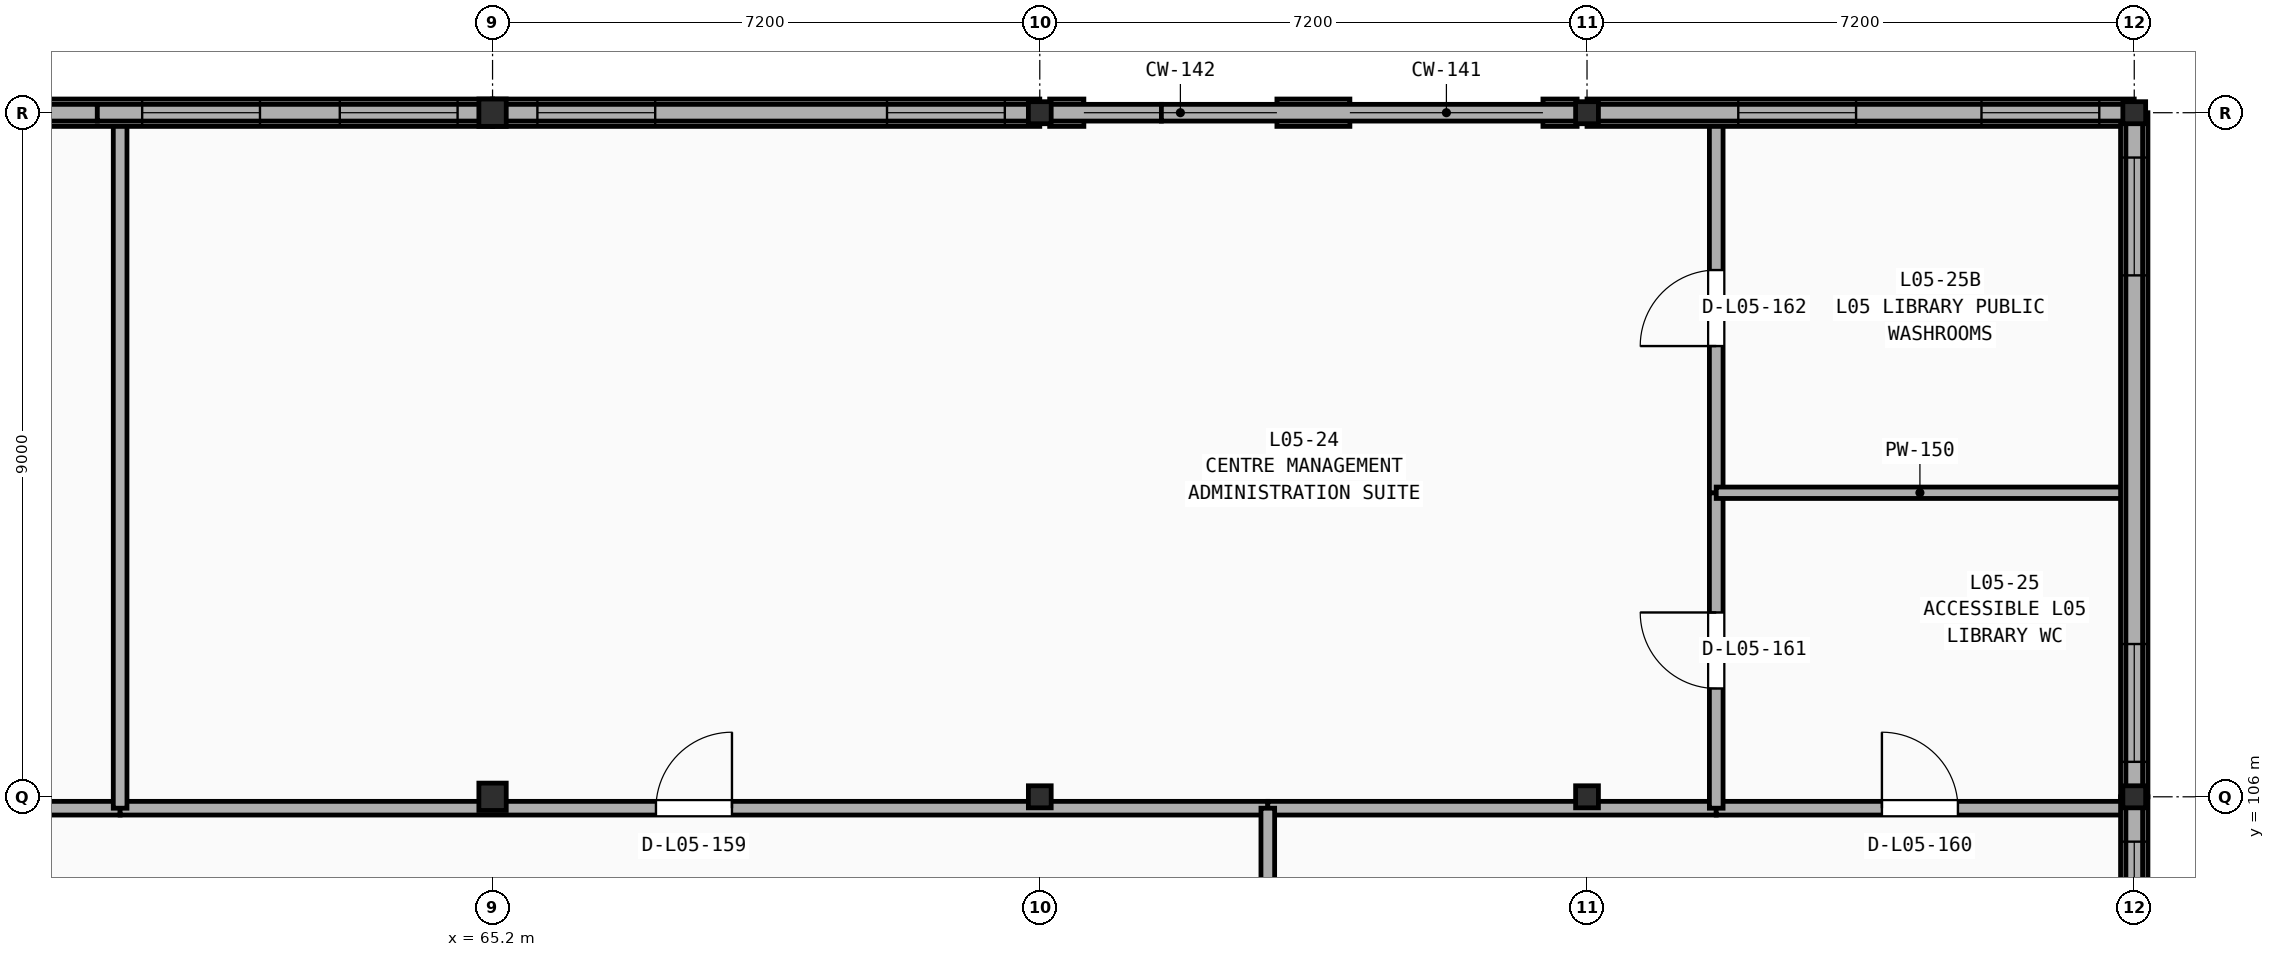
"""IFC4 building model, lengths in metres.
Left out: names, types, materials, properties, quantities, classifications, styles, units other than length and angle.
Written with IfcOpenShell. Run it as: python <this file> out.ifc"""

import sys

from ifc_helpers import new_model, si_unit, direction, frame, frame_2d, origin, origin_2d, place, context, subcontext, project, spatial, rectangle, i_section, extrude, element, fill, save


model = new_model("IFC4")
c1 = context("Model", 3, precision=1e-05, world=origin(), true_north=direction((0.0, 1.0)))
c2 = subcontext(c1, "Body", "Model", "MODEL_VIEW")
j1 = project(units=[si_unit("LENGTHUNIT", "METRE"), si_unit("PLANEANGLEUNIT", "RADIAN")], contexts=[c1])
p1 = place(None, origin())
s1 = spatial("IfcSite", under=j1, at=p1, CompositionType="ELEMENT")
p2 = place(p1, origin())
s2 = spatial("IfcBuilding", under=s1, at=p2, CompositionType="ELEMENT")
p3 = place(p2, frame((0.0, 0.0, 21.6)))
s3 = spatial("IfcBuildingStorey", under=s2, at=p3, CompositionType="ELEMENT", Elevation=21.6)
for number, where, z_axis, x_axis in (
    (1, (65.2, 106.0, 0.0), (0.0, 0.0, 1.0), (1.0, 0.0, 0.0)),
    (2, (65.2, 115.0, 0.0), (0.0, 0.0, 1.0), (1.0, 0.0, 0.0)),
):
    element("IfcColumn", number, at=place(p3, frame(where, z_axis=z_axis, x_axis=x_axis)), inside=s3, PredefinedType="COLUMN", context=c2, shape_type="SweptSolid", body=[
        extrude(rectangle(XDim=0.36, YDim=0.36, at=origin_2d()), origin(), (0.0, 0.0, 1.0), 3.6),
    ])
for number, where, z_axis, x_axis in (
    (3, (72.4, 106.0, 0.0), (0.0, 0.0, 1.0), (1.0, 0.0, 0.0)),
    (4, (72.4, 115.0, 0.0), (0.0, 0.0, 1.0), (1.0, 0.0, 0.0)),
    (5, (79.6, 106.0, 0.0), (0.0, 0.0, 1.0), (1.0, 0.0, 0.0)),
    (6, (79.6, 115.0, 0.0), (0.0, 0.0, 1.0), (1.0, 0.0, 0.0)),
    (7, (86.8, 106.0, 0.0), (0.0, 0.0, 1.0), (1.0, 0.0, 0.0)),
    (8, (86.8, 115.0, 0.0), (0.0, 0.0, 1.0), (1.0, 0.0, 0.0)),
):
    element("IfcColumn", number, at=place(p3, frame(where, z_axis=z_axis, x_axis=x_axis)), inside=s3, PredefinedType="COLUMN", context=c2, shape_type="SweptSolid", body=[
        extrude(i_section(OverallWidth=0.3, OverallDepth=0.29, WebThickness=0.009, FlangeThickness=0.014, at=origin_2d()), origin(), (0.0, 0.0, 1.0), 3.6),
    ])
p4 = place(p3, frame((54.55, 105.85, 0.0), z_axis=(0.0, 0.0, 1.0), x_axis=(1.0, 0.0, 0.0)))
e9 = element("IfcWall", 9, at=p4, inside=s3, PredefinedType="PARTITIONING", context=c2, shape_type="SweptSolid", body=[
    extrude(rectangle(XDim=5.75, YDim=0.18, at=frame_2d((2.875, 0.0))), origin(), (0.0, 0.0, 1.0), 2.71),
])
p5 = place(p3, frame((60.3, 105.85, 0.0), z_axis=(0.0, 0.0, 1.0), x_axis=(1.0, 0.0, 0.0)))
e10 = element("IfcWall", 10, at=p5, inside=s3, PredefinedType="PARTITIONING", context=c2, shape_type="SweptSolid", body=[
    extrude(rectangle(XDim=15.1, YDim=0.18, at=frame_2d((7.55, 0.0))), origin(), (0.0, 0.0, 1.0), 2.71),
])
p6 = place(p5, frame((7.05, 0.0, -0.01)))
e11 = element("IfcOpeningElement", 11, at=p6, cuts=e10, PredefinedType="OPENING", context=c2, shape_type="SweptSolid", body=[
    extrude(rectangle(XDim=1.0, YDim=2.16, at=frame_2d((0.5, 1.08))), frame((0.0, 0.1, 0.0), z_axis=(0.0, -1.0, 0.0), x_axis=(1.0, 0.0, 0.0)), (0.0, 0.0, 1.0), 0.2),
])
p7 = place(p3, frame((75.4, 105.85, 0.0), z_axis=(0.0, 0.0, 1.0), x_axis=(1.0, 0.0, 0.0)))
e12 = element("IfcWall", 12, at=p7, inside=s3, PredefinedType="PARTITIONING", context=c2, shape_type="SweptSolid", body=[
    extrude(rectangle(XDim=5.9, YDim=0.18, at=frame_2d((2.95, 0.0))), origin(), (0.0, 0.0, 1.0), 2.71),
])
p8 = place(p3, frame((81.3, 105.85, 0.0), z_axis=(0.0, 0.0, 1.0), x_axis=(1.0, 0.0, 0.0)))
e13 = element("IfcWall", 13, at=p8, inside=s3, PredefinedType="PARTITIONING", context=c2, shape_type="SweptSolid", body=[
    extrude(rectangle(XDim=5.36, YDim=0.18, at=frame_2d((2.68, 0.0))), origin(), (0.0, 0.0, 1.0), 2.71),
])
p9 = place(p8, frame((2.18, 0.0, -0.01)))
e14 = element("IfcOpeningElement", 14, at=p9, cuts=e13, PredefinedType="OPENING", context=c2, shape_type="SweptSolid", body=[
    extrude(rectangle(XDim=1.0, YDim=2.16, at=frame_2d((0.5, 1.08))), frame((0.0, 0.1, 0.0), z_axis=(0.0, -1.0, 0.0), x_axis=(1.0, 0.0, 0.0)), (0.0, 0.0, 1.0), 0.2),
])
p10 = place(p3, frame((60.3, 105.85, 0.0), z_axis=(0.0, 0.0, 1.0), x_axis=(0.0, 1.0, 0.0)))
e15 = element("IfcWall", 15, at=p10, inside=s3, PredefinedType="PARTITIONING", context=c2, shape_type="SweptSolid", body=[
    extrude(rectangle(XDim=9.01, YDim=0.18, at=frame_2d((4.505, 0.0))), origin(), (0.0, 0.0, 1.0), 2.71),
])
p11 = place(p3, frame((81.3, 105.85, 0.0), z_axis=(0.0, 0.0, 1.0), x_axis=(0.0, 1.0, 0.0)))
e16 = element("IfcWall", 16, at=p11, inside=s3, PredefinedType="PARTITIONING", context=c2, shape_type="SweptSolid", body=[
    extrude(rectangle(XDim=4.15, YDim=0.18, at=frame_2d((2.075, 0.0))), origin(), (0.0, 0.0, 1.0), 2.71),
])
p12 = place(p11, frame((1.575, 0.0, -0.01)))
e17 = element("IfcOpeningElement", 17, at=p12, cuts=e16, PredefinedType="OPENING", context=c2, shape_type="SweptSolid", body=[
    extrude(rectangle(XDim=1.0, YDim=2.16, at=frame_2d((0.5, 1.08))), frame((0.0, 0.1, 0.0), z_axis=(0.0, -1.0, 0.0), x_axis=(1.0, 0.0, 0.0)), (0.0, 0.0, 1.0), 0.2),
])
p13 = place(p3, frame((81.3, 110.0, 0.0), z_axis=(0.0, 0.0, 1.0), x_axis=(0.0, 1.0, 0.0)))
e18 = element("IfcWall", 18, at=p13, inside=s3, PredefinedType="PARTITIONING", context=c2, shape_type="SweptSolid", body=[
    extrude(rectangle(XDim=4.86, YDim=0.18, at=frame_2d((2.43, 0.0))), origin(), (0.0, 0.0, 1.0), 2.71),
])
p14 = place(p13, frame((1.93, 0.0, -0.01)))
e19 = element("IfcOpeningElement", 19, at=p14, cuts=e18, PredefinedType="OPENING", context=c2, shape_type="SweptSolid", body=[
    extrude(rectangle(XDim=1.0, YDim=2.16, at=frame_2d((0.5, 1.08))), frame((0.0, 0.1, 0.0), z_axis=(0.0, -1.0, 0.0), x_axis=(1.0, 0.0, 0.0)), (0.0, 0.0, 1.0), 0.2),
])
p15 = place(p3, frame((81.3, 110.0, 0.0), z_axis=(0.0, 0.0, 1.0), x_axis=(1.0, 0.0, 0.0)))
e20 = element("IfcWall", 20, at=p15, inside=s3, PredefinedType="PARTITIONING", context=c2, shape_type="SweptSolid", body=[
    extrude(rectangle(XDim=5.36, YDim=0.15, at=frame_2d((2.68, 0.0))), origin(), (0.0, 0.0, 1.0), 2.79),
])
p16 = place(p3, frame((75.4, 97.5, 0.0), z_axis=(0.0, 0.0, 1.0), x_axis=(0.0, 1.0, 0.0)))
e21 = element("IfcWall", 21, at=p16, inside=s3, PredefinedType="PARTITIONING", context=c2, shape_type="SweptSolid", body=[
    extrude(rectangle(XDim=8.35, YDim=0.18, at=frame_2d((4.175, 0.0))), origin(), (0.0, 0.0, 1.0), 2.71),
])
p17 = place(p3, frame((65.2, 115.0, 0.0), z_axis=(0.0, 0.0, 1.0), x_axis=(-1.0, 0.0, 0.0)))
e22 = element("IfcWall", 22, at=p17, inside=s3, PredefinedType="SOLIDWALL", context=c2, shape_type="SweptSolid", body=[
    extrude(rectangle(XDim=7.2, YDim=0.36, at=frame_2d((3.6, 0.0))), origin(), (0.0, 0.0, 1.0), 2.71),
])
p18 = place(p17, frame((0.46, 0.0, 0.75)))
e23 = element("IfcOpeningElement", 23, at=p18, cuts=e22, PredefinedType="OPENING", context=c2, shape_type="SweptSolid", body=[
    extrude(rectangle(XDim=1.55, YDim=1.82, at=frame_2d((0.775, 0.91))), frame((0.0, 0.19, 0.0), z_axis=(0.0, -1.0, 0.0), x_axis=(1.0, 0.0, 0.0)), (0.0, 0.0, 1.0), 0.38),
])
p19 = place(p17, frame((3.06, 0.0, 0.75)))
e24 = element("IfcOpeningElement", 24, at=p19, cuts=e22, PredefinedType="OPENING", context=c2, shape_type="SweptSolid", body=[
    extrude(rectangle(XDim=1.55, YDim=1.82, at=frame_2d((0.775, 0.91))), frame((0.0, 0.19, 0.0), z_axis=(0.0, -1.0, 0.0), x_axis=(1.0, 0.0, 0.0)), (0.0, 0.0, 1.0), 0.38),
])
p20 = place(p3, frame((72.4, 115.0, 0.0), z_axis=(0.0, 0.0, 1.0), x_axis=(-1.0, 0.0, 0.0)))
e25 = element("IfcWall", 25, at=p20, inside=s3, PredefinedType="SOLIDWALL", context=c2, shape_type="SweptSolid", body=[
    extrude(rectangle(XDim=7.2, YDim=0.36, at=frame_2d((3.6, 0.0))), origin(), (0.0, 0.0, 1.0), 2.71),
])
p21 = place(p20, frame((0.46, 0.0, 0.75)))
e26 = element("IfcOpeningElement", 26, at=p21, cuts=e25, PredefinedType="OPENING", context=c2, shape_type="SweptSolid", body=[
    extrude(rectangle(XDim=1.55, YDim=1.82, at=frame_2d((0.775, 0.91))), frame((0.0, 0.19, 0.0), z_axis=(0.0, -1.0, 0.0), x_axis=(1.0, 0.0, 0.0)), (0.0, 0.0, 1.0), 0.38),
])
p22 = place(p20, frame((5.06, 0.0, 0.75)))
e27 = element("IfcOpeningElement", 27, at=p22, cuts=e25, PredefinedType="OPENING", context=c2, shape_type="SweptSolid", body=[
    extrude(rectangle(XDim=1.55, YDim=1.82, at=frame_2d((0.775, 0.91))), frame((0.0, 0.19, 0.0), z_axis=(0.0, -1.0, 0.0), x_axis=(1.0, 0.0, 0.0)), (0.0, 0.0, 1.0), 0.38),
])
p23 = place(p3, frame((76.48, 115.0, 0.0), z_axis=(0.0, 0.0, 1.0), x_axis=(-1.0, 0.0, 0.0)))
e28 = element("IfcWall", 28, at=p23, inside=s3, PredefinedType="SOLIDWALL", context=c2, shape_type="SweptSolid", body=[
    extrude(rectangle(XDim=0.96, YDim=0.36, at=frame_2d((0.48, 0.0))), origin(), (0.0, 0.0, 1.0), 2.71),
])
for number, where, z_axis, x_axis in (
    (29, (79.47, 115.0, 0.0), (0.0, 0.0, 1.0), (-1.0, 0.0, 0.0)),
    (30, (72.98, 115.0, 0.0), (0.0, 0.0, 1.0), (-1.0, 0.0, 0.0)),
):
    element("IfcWall", number, at=place(p3, frame(where, z_axis=z_axis, x_axis=x_axis)), inside=s3, PredefinedType="SOLIDWALL", context=c2, shape_type="SweptSolid", body=[
        extrude(rectangle(XDim=0.45, YDim=0.36, at=frame_2d((0.225, 0.0))), origin(), (0.0, 0.0, 1.0), 2.71),
    ])
p24 = place(p3, frame((86.8, 115.0, 0.0), z_axis=(0.0, 0.0, 1.0), x_axis=(-1.0, 0.0, 0.0)))
e31 = element("IfcWall", 31, at=p24, inside=s3, PredefinedType="SOLIDWALL", context=c2, shape_type="SweptSolid", body=[
    extrude(rectangle(XDim=7.2, YDim=0.36, at=frame_2d((3.6, 0.0))), origin(), (0.0, 0.0, 1.0), 2.71),
])
p25 = place(p24, frame((0.46, 0.0, 0.75)))
e32 = element("IfcOpeningElement", 32, at=p25, cuts=e31, PredefinedType="OPENING", context=c2, shape_type="SweptSolid", body=[
    extrude(rectangle(XDim=1.55, YDim=1.82, at=frame_2d((0.775, 0.91))), frame((0.0, 0.19, 0.0), z_axis=(0.0, -1.0, 0.0), x_axis=(1.0, 0.0, 0.0)), (0.0, 0.0, 1.0), 0.38),
])
p26 = place(p24, frame((3.66, 0.0, 0.75)))
e33 = element("IfcOpeningElement", 33, at=p26, cuts=e31, PredefinedType="OPENING", context=c2, shape_type="SweptSolid", body=[
    extrude(rectangle(XDim=1.55, YDim=1.82, at=frame_2d((0.775, 0.91))), frame((0.0, 0.19, 0.0), z_axis=(0.0, -1.0, 0.0), x_axis=(1.0, 0.0, 0.0)), (0.0, 0.0, 1.0), 0.38),
])
p27 = place(p3, frame((86.8, 97.6, 0.0), z_axis=(0.0, 0.0, 1.0), x_axis=(0.0, 1.0, 0.0)))
e34 = element("IfcWall", 34, at=p27, inside=s3, PredefinedType="SOLIDWALL", context=c2, shape_type="SweptSolid", body=[
    extrude(rectangle(XDim=8.4, YDim=0.36, at=frame_2d((4.2, 0.0))), origin(), (0.0, 0.0, 1.0), 2.71),
])
p28 = place(p27, frame((0.46, 0.0, 0.75)))
e35 = element("IfcOpeningElement", 35, at=p28, cuts=e34, PredefinedType="OPENING", context=c2, shape_type="SweptSolid", body=[
    extrude(rectangle(XDim=1.55, YDim=1.82, at=frame_2d((0.775, 0.91))), frame((0.0, 0.19, 0.0), z_axis=(0.0, -1.0, 0.0), x_axis=(1.0, 0.0, 0.0)), (0.0, 0.0, 1.0), 0.38),
])
p29 = place(p27, frame((6.26, 0.0, 0.75)))
e36 = element("IfcOpeningElement", 36, at=p29, cuts=e34, PredefinedType="OPENING", context=c2, shape_type="SweptSolid", body=[
    extrude(rectangle(XDim=1.55, YDim=1.82, at=frame_2d((0.775, 0.91))), frame((0.0, 0.19, 0.0), z_axis=(0.0, -1.0, 0.0), x_axis=(1.0, 0.0, 0.0)), (0.0, 0.0, 1.0), 0.38),
])
p30 = place(p3, frame((86.8, 106.0, 0.0), z_axis=(0.0, 0.0, 1.0), x_axis=(0.0, 1.0, 0.0)))
e37 = element("IfcWall", 37, at=p30, inside=s3, PredefinedType="SOLIDWALL", context=c2, shape_type="SweptSolid", body=[
    extrude(rectangle(XDim=9.0, YDim=0.36, at=frame_2d((4.5, 0.0))), origin(), (0.0, 0.0, 1.0), 2.71),
])
p31 = place(p30, frame((0.46, 0.0, 0.75)))
e38 = element("IfcOpeningElement", 38, at=p31, cuts=e37, PredefinedType="OPENING", context=c2, shape_type="SweptSolid", body=[
    extrude(rectangle(XDim=1.55, YDim=1.82, at=frame_2d((0.775, 0.91))), frame((0.0, 0.19, 0.0), z_axis=(0.0, -1.0, 0.0), x_axis=(1.0, 0.0, 0.0)), (0.0, 0.0, 1.0), 0.38),
])
p32 = place(p30, frame((6.86, 0.0, 0.75)))
e39 = element("IfcOpeningElement", 39, at=p32, cuts=e37, PredefinedType="OPENING", context=c2, shape_type="SweptSolid", body=[
    extrude(rectangle(XDim=1.55, YDim=1.82, at=frame_2d((0.775, 0.91))), frame((0.0, 0.19, 0.0), z_axis=(0.0, -1.0, 0.0), x_axis=(1.0, 0.0, 0.0)), (0.0, 0.0, 1.0), 0.38),
])
p33 = place(p3, frame((46.0, 115.0, 3.6), z_axis=(0.0, 0.0, 1.0), x_axis=(1.0, 0.0, 0.0)))
e40 = element("IfcWall", 40, at=p33, inside=s3, PredefinedType="PARAPET", context=c2, shape_type="SweptSolid", body=[
    extrude(rectangle(XDim=14.0, YDim=0.22, at=frame_2d((7.0, 0.0))), origin(), (0.0, 0.0, 1.0), 1.2),
])
p34 = place(p3, frame((60.0, 115.0, 3.6), z_axis=(0.0, 0.0, 1.0), x_axis=(1.0, 0.0, 0.0)))
e41 = element("IfcWall", 41, at=p34, inside=s3, PredefinedType="PARAPET", context=c2, shape_type="SweptSolid", body=[
    extrude(rectangle(XDim=14.0, YDim=0.22, at=frame_2d((7.0, 0.0))), origin(), (0.0, 0.0, 1.0), 1.65),
])
p35 = place(p3, frame((74.0, 115.0, 3.6), z_axis=(0.0, 0.0, 1.0), x_axis=(1.0, 0.0, 0.0)))
e42 = element("IfcWall", 42, at=p35, inside=s3, PredefinedType="PARAPET", context=c2, shape_type="SweptSolid", body=[
    extrude(rectangle(XDim=12.8, YDim=0.22, at=frame_2d((6.4, 0.0))), origin(), (0.0, 0.0, 1.0), 1.2),
])
p36 = place(p3, frame((86.8, 89.2, 3.6), z_axis=(0.0, 0.0, 1.0), x_axis=(0.0, 1.0, 0.0)))
e43 = element("IfcWall", 43, at=p36, inside=s3, PredefinedType="PARAPET", context=c2, shape_type="SweptSolid", body=[
    extrude(rectangle(XDim=25.8, YDim=0.22, at=frame_2d((12.9, 0.0))), origin(), (0.0, 0.0, 1.0), 1.2),
])
p37 = place(p6, frame((1.0, 0.0, 0.01), z_axis=(0.0, 0.0, 1.0), x_axis=(-1.0, 0.0, 0.0)))
e44 = element("IfcDoor", 44, at=p37, inside=s3, OperationType="SINGLE_SWING_RIGHT", PredefinedType="DOOR", context=c2, shape_type="SweptSolid", body=[
    extrude(rectangle(XDim=1.0, YDim=2.15, at=frame_2d((0.5, 1.075))), frame((0.0, 0.025, 0.0), z_axis=(0.0, -1.0, 0.0), x_axis=(1.0, 0.0, 0.0)), (0.0, 0.0, 1.0), 0.05),
])
fill(e11, e44)
p38 = place(p9, frame((0.0, 0.0, 0.01)))
e45 = element("IfcDoor", 45, at=p38, inside=s3, OperationType="SINGLE_SWING_LEFT", PredefinedType="DOOR", context=c2, shape_type="SweptSolid", body=[
    extrude(rectangle(XDim=1.0, YDim=2.15, at=frame_2d((0.5, 1.075))), frame((0.0, 0.025, 0.0), z_axis=(0.0, -1.0, 0.0), x_axis=(1.0, 0.0, 0.0)), (0.0, 0.0, 1.0), 0.05),
])
fill(e14, e45)
p39 = place(p12, frame((0.0, 0.0, 0.01)))
e46 = element("IfcDoor", 46, at=p39, inside=s3, OperationType="SINGLE_SWING_RIGHT", PredefinedType="DOOR", context=c2, shape_type="SweptSolid", body=[
    extrude(rectangle(XDim=1.0, YDim=2.15, at=frame_2d((0.5, 1.075))), frame((0.0, 0.025, 0.0), z_axis=(0.0, -1.0, 0.0), x_axis=(1.0, 0.0, 0.0)), (0.0, 0.0, 1.0), 0.05),
])
fill(e17, e46)
p40 = place(p14, frame((1.0, 0.0, 0.01), z_axis=(0.0, 0.0, 1.0), x_axis=(-1.0, 0.0, 0.0)))
e47 = element("IfcDoor", 47, at=p40, inside=s3, OperationType="SINGLE_SWING_LEFT", PredefinedType="DOOR", context=c2, shape_type="SweptSolid", body=[
    extrude(rectangle(XDim=1.0, YDim=2.15, at=frame_2d((0.5, 1.075))), frame((0.0, 0.025, 0.0), z_axis=(0.0, -1.0, 0.0), x_axis=(1.0, 0.0, 0.0)), (0.0, 0.0, 1.0), 0.05),
])
fill(e19, e47)
p41 = place(p18, origin())
e48 = element("IfcWindow", 48, at=p41, inside=s3, PartitioningType="DOUBLE_PANEL_HORIZONTAL", PredefinedType="WINDOW", context=c2, shape_type="SweptSolid", body=[
    extrude(rectangle(XDim=1.55, YDim=1.82, at=frame_2d((0.775, 0.91))), frame((0.0, 0.03, 0.0), z_axis=(0.0, -1.0, 0.0), x_axis=(1.0, 0.0, 0.0)), (0.0, 0.0, 1.0), 0.06),
])
fill(e23, e48)
p42 = place(p19, origin())
e49 = element("IfcWindow", 49, at=p42, inside=s3, PartitioningType="DOUBLE_PANEL_HORIZONTAL", PredefinedType="WINDOW", context=c2, shape_type="SweptSolid", body=[
    extrude(rectangle(XDim=1.55, YDim=1.82, at=frame_2d((0.775, 0.91))), frame((0.0, 0.03, 0.0), z_axis=(0.0, -1.0, 0.0), x_axis=(1.0, 0.0, 0.0)), (0.0, 0.0, 1.0), 0.06),
])
fill(e24, e49)
p43 = place(p21, origin())
e50 = element("IfcWindow", 50, at=p43, inside=s3, PartitioningType="DOUBLE_PANEL_HORIZONTAL", PredefinedType="WINDOW", context=c2, shape_type="SweptSolid", body=[
    extrude(rectangle(XDim=1.55, YDim=1.82, at=frame_2d((0.775, 0.91))), frame((0.0, 0.03, 0.0), z_axis=(0.0, -1.0, 0.0), x_axis=(1.0, 0.0, 0.0)), (0.0, 0.0, 1.0), 0.06),
])
fill(e26, e50)
p44 = place(p22, origin())
e51 = element("IfcWindow", 51, at=p44, inside=s3, PartitioningType="DOUBLE_PANEL_HORIZONTAL", PredefinedType="WINDOW", context=c2, shape_type="SweptSolid", body=[
    extrude(rectangle(XDim=1.55, YDim=1.82, at=frame_2d((0.775, 0.91))), frame((0.0, 0.03, 0.0), z_axis=(0.0, -1.0, 0.0), x_axis=(1.0, 0.0, 0.0)), (0.0, 0.0, 1.0), 0.06),
])
fill(e27, e51)
p45 = place(p25, origin())
e52 = element("IfcWindow", 52, at=p45, inside=s3, PartitioningType="DOUBLE_PANEL_HORIZONTAL", PredefinedType="WINDOW", context=c2, shape_type="SweptSolid", body=[
    extrude(rectangle(XDim=1.55, YDim=1.82, at=frame_2d((0.775, 0.91))), frame((0.0, 0.03, 0.0), z_axis=(0.0, -1.0, 0.0), x_axis=(1.0, 0.0, 0.0)), (0.0, 0.0, 1.0), 0.06),
])
fill(e32, e52)
p46 = place(p26, origin())
e53 = element("IfcWindow", 53, at=p46, inside=s3, PartitioningType="DOUBLE_PANEL_HORIZONTAL", PredefinedType="WINDOW", context=c2, shape_type="SweptSolid", body=[
    extrude(rectangle(XDim=1.55, YDim=1.82, at=frame_2d((0.775, 0.91))), frame((0.0, 0.03, 0.0), z_axis=(0.0, -1.0, 0.0), x_axis=(1.0, 0.0, 0.0)), (0.0, 0.0, 1.0), 0.06),
])
fill(e33, e53)
p47 = place(p29, origin())
e54 = element("IfcWindow", 54, at=p47, inside=s3, PartitioningType="DOUBLE_PANEL_HORIZONTAL", PredefinedType="WINDOW", context=c2, shape_type="SweptSolid", body=[
    extrude(rectangle(XDim=1.55, YDim=1.82, at=frame_2d((0.775, 0.91))), frame((0.0, 0.03, 0.0), z_axis=(0.0, -1.0, 0.0), x_axis=(1.0, 0.0, 0.0)), (0.0, 0.0, 1.0), 0.06),
])
fill(e36, e54)
p48 = place(p31, origin())
e55 = element("IfcWindow", 55, at=p48, inside=s3, PartitioningType="DOUBLE_PANEL_HORIZONTAL", PredefinedType="WINDOW", context=c2, shape_type="SweptSolid", body=[
    extrude(rectangle(XDim=1.55, YDim=1.82, at=frame_2d((0.775, 0.91))), frame((0.0, 0.03, 0.0), z_axis=(0.0, -1.0, 0.0), x_axis=(1.0, 0.0, 0.0)), (0.0, 0.0, 1.0), 0.06),
])
fill(e38, e55)
p49 = place(p32, origin())
e56 = element("IfcWindow", 56, at=p49, inside=s3, PartitioningType="DOUBLE_PANEL_HORIZONTAL", PredefinedType="WINDOW", context=c2, shape_type="SweptSolid", body=[
    extrude(rectangle(XDim=1.55, YDim=1.82, at=frame_2d((0.775, 0.91))), frame((0.0, 0.03, 0.0), z_axis=(0.0, -1.0, 0.0), x_axis=(1.0, 0.0, 0.0)), (0.0, 0.0, 1.0), 0.06),
])
fill(e39, e56)
save(model, sys.argv[1])
